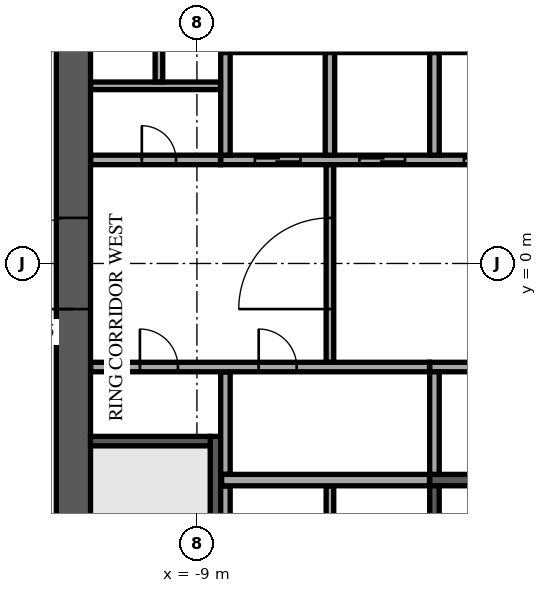
"""IFC4 building model, lengths in metres.
Left out: names, types, materials, properties, quantities, classifications, styles, units other than length and angle.
Written with IfcOpenShell. Run it as: python <this file> out.ifc"""

import sys

from ifc_helpers import new_model, si_unit, direction, frame, frame_2d, origin, place, context, subcontext, project, spatial, rectangle, extrude, element, fill, save


model = new_model("IFC4")
c1 = context("Model", 3, precision=1e-05, world=origin(), true_north=direction((0.0, 1.0)))
c2 = subcontext(c1, "Body", "Model", "MODEL_VIEW")
j1 = project(units=[si_unit("LENGTHUNIT", "METRE"), si_unit("PLANEANGLEUNIT", "RADIAN")], contexts=[c1])
p1 = place(None, origin())
s1 = spatial("IfcSite", under=j1, at=p1, CompositionType="ELEMENT")
p2 = place(p1, origin())
s2 = spatial("IfcBuilding", under=s1, at=p2, CompositionType="ELEMENT")
p3 = place(p2, frame((0.0, 0.0, 225.3)))
s3 = spatial("IfcBuildingStorey", under=s2, at=p3, CompositionType="ELEMENT", Elevation=225.3)
p4 = place(p3, frame((-12.25, -11.8, 0.0), z_axis=(0.0, 0.0, 1.0), x_axis=(0.0, 1.0, 0.0)))
e1 = element("IfcWall", 1, at=p4, inside=s3, PredefinedType="SHEAR", context=c2, shape_type="SweptSolid", body=[
    extrude(rectangle(XDim=23.6, YDim=0.9, at=frame_2d((11.8, 0.0))), origin(), (0.0, 0.0, 1.0), 3.62),
])
p5 = place(p4, frame((10.6, 0.0, 0.0)))
e2 = element("IfcOpeningElement", 2, at=p5, cuts=e1, PredefinedType="OPENING", context=c2, shape_type="SweptSolid", body=[
    extrude(rectangle(XDim=2.4, YDim=2.4, at=frame_2d((1.2, 1.2))), frame((0.0, 0.46, 0.0), z_axis=(0.0, -1.0, 0.0), x_axis=(1.0, 0.0, 0.0)), (0.0, 0.0, 1.0), 0.92),
])
p6 = place(p3, frame((-8.375, 5.7, 0.0), z_axis=(0.0, 0.0, 1.0), x_axis=(1.0, 0.0, 0.0)))
e3 = element("IfcWall", 3, at=p6, inside=s3, PredefinedType="SOLIDWALL", context=c2, shape_type="SweptSolid", body=[
    extrude(rectangle(XDim=16.75, YDim=0.3, at=frame_2d((8.375, 0.0))), origin(), (0.0, 0.0, 1.0), 3.62),
])
p7 = place(p3, frame((-2.875, -5.7, 0.0), z_axis=(0.0, 0.0, 1.0), x_axis=(1.0, 0.0, 0.0)))
e4 = element("IfcWall", 4, at=p7, inside=s3, PredefinedType="SOLIDWALL", context=c2, shape_type="SweptSolid", body=[
    extrude(rectangle(XDim=11.25, YDim=0.3, at=frame_2d((5.625, 0.0))), origin(), (0.0, 0.0, 1.0), 3.62),
])
p8 = place(p3, frame((-8.375, 2.725, 0.0), z_axis=(0.0, 0.0, 1.0), x_axis=(1.0, 0.0, 0.0)))
e5 = element("IfcWall", 5, at=p8, inside=s3, PredefinedType="SOLIDWALL", context=c2, shape_type="SweptSolid", body=[
    extrude(rectangle(XDim=16.75, YDim=0.25, at=frame_2d((8.375, 0.0))), origin(), (0.0, 0.0, 1.0), 3.62),
])
p9 = place(p8, frame((0.9, 0.0, 0.0)))
e6 = element("IfcOpeningElement", 6, at=p9, cuts=e5, PredefinedType="OPENING", context=c2, shape_type="SweptSolid", body=[
    extrude(rectangle(XDim=1.2, YDim=2.1, at=frame_2d((0.6, 1.05))), frame((0.0, 0.135, 0.0), z_axis=(0.0, -1.0, 0.0), x_axis=(1.0, 0.0, 0.0)), (0.0, 0.0, 1.0), 0.27),
])
p10 = place(p8, frame((3.65, 0.0, 0.0)))
e7 = element("IfcOpeningElement", 7, at=p10, cuts=e5, PredefinedType="OPENING", context=c2, shape_type="SweptSolid", body=[
    extrude(rectangle(XDim=1.2, YDim=2.1, at=frame_2d((0.6, 1.05))), frame((0.0, 0.135, 0.0), z_axis=(0.0, -1.0, 0.0), x_axis=(1.0, 0.0, 0.0)), (0.0, 0.0, 1.0), 0.27),
])
p11 = place(p8, frame((6.4, 0.0, 0.0)))
e8 = element("IfcOpeningElement", 8, at=p11, cuts=e5, PredefinedType="OPENING", context=c2, shape_type="SweptSolid", body=[
    extrude(rectangle(XDim=1.2, YDim=2.1, at=frame_2d((0.6, 1.05))), frame((0.0, 0.135, 0.0), z_axis=(0.0, -1.0, 0.0), x_axis=(1.0, 0.0, 0.0)), (0.0, 0.0, 1.0), 0.27),
])
p12 = place(p8, frame((9.15, 0.0, 0.0)))
e9 = element("IfcOpeningElement", 9, at=p12, cuts=e5, PredefinedType="OPENING", context=c2, shape_type="SweptSolid", body=[
    extrude(rectangle(XDim=1.2, YDim=2.1, at=frame_2d((0.6, 1.05))), frame((0.0, 0.135, 0.0), z_axis=(0.0, -1.0, 0.0), x_axis=(1.0, 0.0, 0.0)), (0.0, 0.0, 1.0), 0.27),
])
p13 = place(p8, frame((11.9, 0.0, 0.0)))
e10 = element("IfcOpeningElement", 10, at=p13, cuts=e5, PredefinedType="OPENING", context=c2, shape_type="SweptSolid", body=[
    extrude(rectangle(XDim=1.2, YDim=2.1, at=frame_2d((0.6, 1.05))), frame((0.0, 0.135, 0.0), z_axis=(0.0, -1.0, 0.0), x_axis=(1.0, 0.0, 0.0)), (0.0, 0.0, 1.0), 0.27),
])
p14 = place(p8, frame((14.65, 0.0, 0.0)))
e11 = element("IfcOpeningElement", 11, at=p14, cuts=e5, PredefinedType="OPENING", context=c2, shape_type="SweptSolid", body=[
    extrude(rectangle(XDim=1.2, YDim=2.1, at=frame_2d((0.6, 1.05))), frame((0.0, 0.135, 0.0), z_axis=(0.0, -1.0, 0.0), x_axis=(1.0, 0.0, 0.0)), (0.0, 0.0, 1.0), 0.27),
])
for number, where, z_axis, x_axis in (
    (12, (-8.25, 2.85, 0.0), (0.0, 0.0, 1.0), (0.0, 1.0, 0.0)),
    (13, (-5.5, 2.85, 0.0), (0.0, 0.0, 1.0), (0.0, 1.0, 0.0)),
    (14, (-2.75, 2.85, 0.0), (0.0, 0.0, 1.0), (0.0, 1.0, 0.0)),
):
    element("IfcWall", number, at=place(p3, frame(where, z_axis=z_axis, x_axis=x_axis)), inside=s3, PredefinedType="SOLIDWALL", context=c2, shape_type="SweptSolid", body=[
        extrude(rectangle(XDim=2.7, YDim=0.25, at=frame_2d((1.35, 0.0))), origin(), (0.0, 0.0, 1.0), 3.62),
    ])
p15 = place(p3, frame((-2.875, -2.725, 0.0), z_axis=(0.0, 0.0, 1.0), x_axis=(1.0, 0.0, 0.0)))
e15 = element("IfcWall", 15, at=p15, inside=s3, PredefinedType="SOLIDWALL", context=c2, shape_type="SweptSolid", body=[
    extrude(rectangle(XDim=8.5, YDim=0.25, at=frame_2d((4.25, 0.0))), origin(), (0.0, 0.0, 1.0), 3.62),
])
for number, where, z_axis, x_axis in (
    (16, (-2.75, -5.55, 0.0), (0.0, 0.0, 1.0), (0.0, 1.0, 0.0)),
    (17, (-2.75, -8.55, 0.0), (0.0, 0.0, 1.0), (0.0, 1.0, 0.0)),
):
    element("IfcWall", number, at=place(p3, frame(where, z_axis=z_axis, x_axis=x_axis)), inside=s3, PredefinedType="SOLIDWALL", context=c2, shape_type="SweptSolid", body=[
        extrude(rectangle(XDim=2.7, YDim=0.25, at=frame_2d((1.35, 0.0))), origin(), (0.0, 0.0, 1.0), 3.62),
    ])
p16 = place(p3, frame((-8.512, -4.55, 0.0), z_axis=(0.0, 0.0, 1.0), x_axis=(0.0, -1.0, 0.0)))
e18 = element("IfcWall", 18, at=p16, inside=s3, PredefinedType="SOLIDWALL", context=c2, shape_type="SweptSolid", body=[
    extrude(rectangle(XDim=7.25, YDim=0.275, at=frame_2d((3.625, 0.0))), origin(), (0.0, 0.0, 1.0), 3.62),
])
p17 = place(p16, frame((6.0, 0.0, 0.0)))
e19 = element("IfcOpeningElement", 19, at=p17, cuts=e18, PredefinedType="OPENING", context=c2, shape_type="SweptSolid", body=[
    extrude(rectangle(XDim=1.0, YDim=2.1, at=frame_2d((0.5, 1.05))), frame((0.0, 0.147, 0.0), z_axis=(0.0, -1.0, 0.0), x_axis=(1.0, 0.0, 0.0)), (0.0, 0.0, 1.0), 0.295),
])
p18 = place(p3, frame((-8.65, -4.675, 0.0), z_axis=(0.0, 0.0, 1.0), x_axis=(-1.0, 0.0, 0.0)))
e20 = element("IfcWall", 20, at=p18, inside=s3, PredefinedType="SOLIDWALL", context=c2, shape_type="SweptSolid", body=[
    extrude(rectangle(XDim=3.15, YDim=0.25, at=frame_2d((1.575, 0.0))), origin(), (0.0, 0.0, 1.0), 3.62),
])
p19 = place(p3, frame((-8.25, -8.545, 0.0), z_axis=(0.0, 0.0, 1.0), x_axis=(0.0, 1.0, 0.0)))
e21 = element("IfcWall", 21, at=p19, inside=s3, PredefinedType="PARTITIONING", context=c2, shape_type="SweptSolid", body=[
    extrude(rectangle(XDim=2.69, YDim=0.25, at=frame_2d((1.345, 0.0))), origin(), (0.0, 0.0, 1.0), 3.62),
])
p20 = place(p3, frame((-5.5, -8.545, 0.0), z_axis=(0.0, 0.0, 1.0), x_axis=(0.0, 1.0, 0.0)))
e22 = element("IfcWall", 22, at=p20, inside=s3, PredefinedType="PARTITIONING", context=c2, shape_type="SweptSolid", body=[
    extrude(rectangle(XDim=2.69, YDim=0.2, at=frame_2d((1.345, 0.0))), origin(), (0.0, 0.0, 1.0), 3.62),
])
p21 = place(p3, frame((-8.35, -5.7, 0.0), z_axis=(0.0, 0.0, 1.0), x_axis=(1.0, 0.0, 0.0)))
e23 = element("IfcWall", 23, at=p21, inside=s3, PredefinedType="PARTITIONING", context=c2, shape_type="SweptSolid", body=[
    extrude(rectangle(XDim=5.47, YDim=0.3, at=frame_2d((2.735, 0.0))), origin(), (0.0, 0.0, 1.0), 3.62),
])
p22 = place(p3, frame((-8.25, -5.545, 0.0), z_axis=(0.0, 0.0, 1.0), x_axis=(0.0, 1.0, 0.0)))
e24 = element("IfcWall", 24, at=p22, inside=s3, PredefinedType="PARTITIONING", context=c2, shape_type="SweptSolid", body=[
    extrude(rectangle(XDim=2.69, YDim=0.25, at=frame_2d((1.345, 0.0))), origin(), (0.0, 0.0, 1.0), 3.62),
])
p23 = place(p3, frame((-11.795, -2.725, 0.0), z_axis=(0.0, 0.0, 1.0), x_axis=(1.0, 0.0, 0.0)))
e25 = element("IfcWall", 25, at=p23, inside=s3, PredefinedType="PARTITIONING", context=c2, shape_type="SweptSolid", body=[
    extrude(rectangle(XDim=8.915, YDim=0.25, at=frame_2d((4.458, 0.0))), origin(), (0.0, 0.0, 1.0), 3.62),
])
p24 = place(p23, frame((1.295, 0.0, 0.0)))
e26 = element("IfcOpeningElement", 26, at=p24, cuts=e25, PredefinedType="OPENING", context=c2, shape_type="SweptSolid", body=[
    extrude(rectangle(XDim=1.0, YDim=2.1, at=frame_2d((0.5, 1.05))), frame((0.0, 0.135, 0.0), z_axis=(0.0, -1.0, 0.0), x_axis=(1.0, 0.0, 0.0)), (0.0, 0.0, 1.0), 0.27),
])
p25 = place(p23, frame((4.42, 0.0, 0.0)))
e27 = element("IfcOpeningElement", 27, at=p25, cuts=e25, PredefinedType="OPENING", context=c2, shape_type="SweptSolid", body=[
    extrude(rectangle(XDim=1.0, YDim=2.1, at=frame_2d((0.5, 1.05))), frame((0.0, 0.135, 0.0), z_axis=(0.0, -1.0, 0.0), x_axis=(1.0, 0.0, 0.0)), (0.0, 0.0, 1.0), 0.27),
])
p26 = place(p3, frame((-5.5, -2.595, 0.0), z_axis=(0.0, 0.0, 1.0), x_axis=(0.0, 1.0, 0.0)))
e28 = element("IfcWall", 28, at=p26, inside=s3, PredefinedType="PARTITIONING", context=c2, shape_type="SweptSolid", body=[
    extrude(rectangle(XDim=5.19, YDim=0.2, at=frame_2d((2.595, 0.0))), origin(), (0.0, 0.0, 1.0), 3.62),
])
p27 = place(p26, frame((1.395, 0.0, 0.0)))
e29 = element("IfcOpeningElement", 29, at=p27, cuts=e28, PredefinedType="OPENING", context=c2, shape_type="SweptSolid", body=[
    extrude(rectangle(XDim=2.4, YDim=2.4, at=frame_2d((1.2, 1.2))), frame((0.0, 0.11, 0.0), z_axis=(0.0, -1.0, 0.0), x_axis=(1.0, 0.0, 0.0)), (0.0, 0.0, 1.0), 0.22),
])
p28 = place(p3, frame((-11.795, 2.725, 0.0), z_axis=(0.0, 0.0, 1.0), x_axis=(1.0, 0.0, 0.0)))
e30 = element("IfcWall", 30, at=p28, inside=s3, PredefinedType="PARTITIONING", context=c2, shape_type="SweptSolid", body=[
    extrude(rectangle(XDim=3.415, YDim=0.25, at=frame_2d((1.708, 0.0))), origin(), (0.0, 0.0, 1.0), 3.62),
])
p29 = place(p28, frame((1.345, 0.0, 0.0)))
e31 = element("IfcOpeningElement", 31, at=p29, cuts=e30, PredefinedType="OPENING", context=c2, shape_type="SweptSolid", body=[
    extrude(rectangle(XDim=0.9, YDim=2.1, at=frame_2d((0.45, 1.05))), frame((0.0, 0.135, 0.0), z_axis=(0.0, -1.0, 0.0), x_axis=(1.0, 0.0, 0.0)), (0.0, 0.0, 1.0), 0.27),
])
p30 = place(p3, frame((-11.795, 4.675, 0.0), z_axis=(0.0, 0.0, 1.0), x_axis=(1.0, 0.0, 0.0)))
e32 = element("IfcWall", 32, at=p30, inside=s3, PredefinedType="PARTITIONING", context=c2, shape_type="SweptSolid", body=[
    extrude(rectangle(XDim=3.415, YDim=0.2, at=frame_2d((1.708, 0.0))), origin(), (0.0, 0.0, 1.0), 3.62),
])
p31 = place(p3, frame((-10.0, 4.78, 0.0), z_axis=(0.0, 0.0, 1.0), x_axis=(0.0, 1.0, 0.0)))
e33 = element("IfcWall", 33, at=p31, inside=s3, PredefinedType="PARTITIONING", context=c2, shape_type="SweptSolid", body=[
    extrude(rectangle(XDim=7.015, YDim=0.2, at=frame_2d((3.507, 0.0))), origin(), (0.0, 0.0, 1.0), 3.62),
])
p32 = place(p31, frame((2.92, 0.0, 0.0)))
e34 = element("IfcOpeningElement", 34, at=p32, cuts=e33, PredefinedType="OPENING", context=c2, shape_type="SweptSolid", body=[
    extrude(rectangle(XDim=1.0, YDim=2.1, at=frame_2d((0.5, 1.05))), frame((0.0, 0.11, 0.0), z_axis=(0.0, -1.0, 0.0), x_axis=(1.0, 0.0, 0.0)), (0.0, 0.0, 1.0), 0.22),
])
p33 = place(p3, frame((-3.777, 34.584, 0.0), z_axis=(0.0, 0.0, 1.0), x_axis=(-0.629323778295, -0.777143218508, 0.0)))
e35 = element("IfcWall", 35, at=p33, inside=s3, PredefinedType="STANDARD", context=c2, shape_type="SweptSolid", body=[
    extrude(rectangle(XDim=49.0, YDim=0.6, at=frame_2d((24.5, 0.0))), origin(), (0.0, 0.0, 1.0), 3.62),
])
p34 = place(p33, frame((1.227, 0.0, 0.9)))
e36 = element("IfcOpeningElement", 36, at=p34, cuts=e35, PredefinedType="OPENING", context=c2, shape_type="SweptSolid", body=[
    extrude(rectangle(XDim=2.0, YDim=2.1, at=frame_2d((1.0, 1.05))), frame((0.0, 0.31, 0.0), z_axis=(0.0, -1.0, 0.0), x_axis=(1.0, 0.0, 0.0)), (0.0, 0.0, 1.0), 0.62),
])
p35 = place(p33, frame((5.682, 0.0, 0.9)))
e37 = element("IfcOpeningElement", 37, at=p35, cuts=e35, PredefinedType="OPENING", context=c2, shape_type="SweptSolid", body=[
    extrude(rectangle(XDim=2.0, YDim=2.1, at=frame_2d((1.0, 1.05))), frame((0.0, 0.31, 0.0), z_axis=(0.0, -1.0, 0.0), x_axis=(1.0, 0.0, 0.0)), (0.0, 0.0, 1.0), 0.62),
])
p36 = place(p33, frame((10.136, 0.0, 0.9)))
e38 = element("IfcOpeningElement", 38, at=p36, cuts=e35, PredefinedType="OPENING", context=c2, shape_type="SweptSolid", body=[
    extrude(rectangle(XDim=2.0, YDim=2.1, at=frame_2d((1.0, 1.05))), frame((0.0, 0.31, 0.0), z_axis=(0.0, -1.0, 0.0), x_axis=(1.0, 0.0, 0.0)), (0.0, 0.0, 1.0), 0.62),
])
p37 = place(p33, frame((14.591, 0.0, 0.9)))
e39 = element("IfcOpeningElement", 39, at=p37, cuts=e35, PredefinedType="OPENING", context=c2, shape_type="SweptSolid", body=[
    extrude(rectangle(XDim=2.0, YDim=2.1, at=frame_2d((1.0, 1.05))), frame((0.0, 0.31, 0.0), z_axis=(0.0, -1.0, 0.0), x_axis=(1.0, 0.0, 0.0)), (0.0, 0.0, 1.0), 0.62),
])
p38 = place(p33, frame((19.045, 0.0, 0.9)))
e40 = element("IfcOpeningElement", 40, at=p38, cuts=e35, PredefinedType="OPENING", context=c2, shape_type="SweptSolid", body=[
    extrude(rectangle(XDim=2.0, YDim=2.1, at=frame_2d((1.0, 1.05))), frame((0.0, 0.31, 0.0), z_axis=(0.0, -1.0, 0.0), x_axis=(1.0, 0.0, 0.0)), (0.0, 0.0, 1.0), 0.62),
])
p39 = place(p33, frame((23.5, 0.0, 0.9)))
e41 = element("IfcOpeningElement", 41, at=p39, cuts=e35, PredefinedType="OPENING", context=c2, shape_type="SweptSolid", body=[
    extrude(rectangle(XDim=2.0, YDim=2.1, at=frame_2d((1.0, 1.05))), frame((0.0, 0.31, 0.0), z_axis=(0.0, -1.0, 0.0), x_axis=(1.0, 0.0, 0.0)), (0.0, 0.0, 1.0), 0.62),
])
p40 = place(p33, frame((27.955, 0.0, 0.9)))
e42 = element("IfcOpeningElement", 42, at=p40, cuts=e35, PredefinedType="OPENING", context=c2, shape_type="SweptSolid", body=[
    extrude(rectangle(XDim=2.0, YDim=2.1, at=frame_2d((1.0, 1.05))), frame((0.0, 0.31, 0.0), z_axis=(0.0, -1.0, 0.0), x_axis=(1.0, 0.0, 0.0)), (0.0, 0.0, 1.0), 0.62),
])
p41 = place(p33, frame((32.409, 0.0, 0.9)))
e43 = element("IfcOpeningElement", 43, at=p41, cuts=e35, PredefinedType="OPENING", context=c2, shape_type="SweptSolid", body=[
    extrude(rectangle(XDim=2.0, YDim=2.1, at=frame_2d((1.0, 1.05))), frame((0.0, 0.31, 0.0), z_axis=(0.0, -1.0, 0.0), x_axis=(1.0, 0.0, 0.0)), (0.0, 0.0, 1.0), 0.62),
])
p42 = place(p33, frame((36.864, 0.0, 0.9)))
e44 = element("IfcOpeningElement", 44, at=p42, cuts=e35, PredefinedType="OPENING", context=c2, shape_type="SweptSolid", body=[
    extrude(rectangle(XDim=2.0, YDim=2.1, at=frame_2d((1.0, 1.05))), frame((0.0, 0.31, 0.0), z_axis=(0.0, -1.0, 0.0), x_axis=(1.0, 0.0, 0.0)), (0.0, 0.0, 1.0), 0.62),
])
p43 = place(p33, frame((41.318, 0.0, 0.9)))
e45 = element("IfcOpeningElement", 45, at=p43, cuts=e35, PredefinedType="OPENING", context=c2, shape_type="SweptSolid", body=[
    extrude(rectangle(XDim=2.0, YDim=2.1, at=frame_2d((1.0, 1.05))), frame((0.0, 0.31, 0.0), z_axis=(0.0, -1.0, 0.0), x_axis=(1.0, 0.0, 0.0)), (0.0, 0.0, 1.0), 0.62),
])
p44 = place(p33, frame((45.773, 0.0, 0.9)))
e46 = element("IfcOpeningElement", 46, at=p44, cuts=e35, PredefinedType="OPENING", context=c2, shape_type="SweptSolid", body=[
    extrude(rectangle(XDim=2.0, YDim=2.1, at=frame_2d((1.0, 1.05))), frame((0.0, 0.31, 0.0), z_axis=(0.0, -1.0, 0.0), x_axis=(1.0, 0.0, 0.0)), (0.0, 0.0, 1.0), 0.62),
])
p45 = place(p3, frame((-26.769, -2.487, 0.0), z_axis=(0.0, 0.0, 1.0), x_axis=(0.629320703929, 0.777145708092, 0.0)))
e47 = element("IfcWall", 47, at=p45, inside=s3, PredefinedType="PARTITIONING", context=c2, shape_type="SweptSolid", body=[
    extrude(rectangle(XDim=37.558, YDim=0.15, at=frame_2d((18.779, 0.0))), origin(), (0.0, 0.0, 1.0), 2.97),
])
p46 = place(p45, frame((3.55, 0.0, 0.0)))
e48 = element("IfcOpeningElement", 48, at=p46, cuts=e47, PredefinedType="OPENING", context=c2, shape_type="SweptSolid", body=[
    extrude(rectangle(XDim=1.0, YDim=2.1, at=frame_2d((0.5, 1.05))), frame((0.0, 0.085, 0.0), z_axis=(0.0, -1.0, 0.0), x_axis=(1.0, 0.0, 0.0)), (0.0, 0.0, 1.0), 0.17),
])
p47 = place(p45, frame((11.862, 0.0, 0.0)))
e49 = element("IfcOpeningElement", 49, at=p47, cuts=e47, PredefinedType="OPENING", context=c2, shape_type="SweptSolid", body=[
    extrude(rectangle(XDim=1.0, YDim=2.1, at=frame_2d((0.5, 1.05))), frame((0.0, 0.085, 0.0), z_axis=(0.0, -1.0, 0.0), x_axis=(1.0, 0.0, 0.0)), (0.0, 0.0, 1.0), 0.17),
])
p48 = place(p45, frame((21.452, 0.0, 0.0)))
e50 = element("IfcOpeningElement", 50, at=p48, cuts=e47, PredefinedType="OPENING", context=c2, shape_type="SweptSolid", body=[
    extrude(rectangle(XDim=1.0, YDim=2.1, at=frame_2d((0.5, 1.05))), frame((0.0, 0.085, 0.0), z_axis=(0.0, -1.0, 0.0), x_axis=(1.0, 0.0, 0.0)), (0.0, 0.0, 1.0), 0.17),
])
p49 = place(p45, frame((31.223, 0.0, 0.0)))
e51 = element("IfcOpeningElement", 51, at=p49, cuts=e47, PredefinedType="OPENING", context=c2, shape_type="SweptSolid", body=[
    extrude(rectangle(XDim=1.0, YDim=2.1, at=frame_2d((0.5, 1.05))), frame((0.0, 0.085, 0.0), z_axis=(0.0, -1.0, 0.0), x_axis=(1.0, 0.0, 0.0)), (0.0, 0.0, 1.0), 0.17),
])
p50 = place(p45, frame((35.359, 0.0, 0.0)))
e52 = element("IfcOpeningElement", 52, at=p50, cuts=e47, PredefinedType="OPENING", context=c2, shape_type="SweptSolid", body=[
    extrude(rectangle(XDim=1.0, YDim=2.1, at=frame_2d((0.5, 1.05))), frame((0.0, 0.085, 0.0), z_axis=(0.0, -1.0, 0.0), x_axis=(1.0, 0.0, 0.0)), (0.0, 0.0, 1.0), 0.17),
])
p51 = place(p5, origin())
e53 = element("IfcDoor", 53, at=p51, inside=s3, OperationType="SINGLE_SWING_LEFT", PredefinedType="DOOR", context=c2, shape_type="SweptSolid", body=[
    extrude(rectangle(XDim=2.4, YDim=2.4, at=frame_2d((1.2, 1.2))), frame((0.0, 0.025, 0.0), z_axis=(0.0, -1.0, 0.0), x_axis=(1.0, 0.0, 0.0)), (0.0, 0.0, 1.0), 0.05),
])
fill(e2, e53)
p52 = place(p9, origin())
e54 = element("IfcDoor", 54, at=p52, inside=s3, OperationType="DOUBLE_DOOR_SLIDING", PredefinedType="DOOR", context=c2, shape_type="SweptSolid", body=[
    extrude(rectangle(XDim=1.2, YDim=2.1, at=frame_2d((0.6, 1.05))), frame((0.0, 0.025, 0.0), z_axis=(0.0, -1.0, 0.0), x_axis=(1.0, 0.0, 0.0)), (0.0, 0.0, 1.0), 0.05),
])
fill(e6, e54)
p53 = place(p10, origin())
e55 = element("IfcDoor", 55, at=p53, inside=s3, OperationType="DOUBLE_DOOR_SLIDING", PredefinedType="DOOR", context=c2, shape_type="SweptSolid", body=[
    extrude(rectangle(XDim=1.2, YDim=2.1, at=frame_2d((0.6, 1.05))), frame((0.0, 0.025, 0.0), z_axis=(0.0, -1.0, 0.0), x_axis=(1.0, 0.0, 0.0)), (0.0, 0.0, 1.0), 0.05),
])
fill(e7, e55)
p54 = place(p11, origin())
e56 = element("IfcDoor", 56, at=p54, inside=s3, OperationType="DOUBLE_DOOR_SLIDING", PredefinedType="DOOR", context=c2, shape_type="SweptSolid", body=[
    extrude(rectangle(XDim=1.2, YDim=2.1, at=frame_2d((0.6, 1.05))), frame((0.0, 0.025, 0.0), z_axis=(0.0, -1.0, 0.0), x_axis=(1.0, 0.0, 0.0)), (0.0, 0.0, 1.0), 0.05),
])
fill(e8, e56)
p55 = place(p24, origin())
e57 = element("IfcDoor", 57, at=p55, inside=s3, OperationType="SINGLE_SWING_RIGHT", PredefinedType="DOOR", context=c2, shape_type="SweptSolid", body=[
    extrude(rectangle(XDim=1.0, YDim=2.1, at=frame_2d((0.5, 1.05))), frame((0.0, 0.025, 0.0), z_axis=(0.0, -1.0, 0.0), x_axis=(1.0, 0.0, 0.0)), (0.0, 0.0, 1.0), 0.05),
])
fill(e26, e57)
p56 = place(p29, origin())
e58 = element("IfcDoor", 58, at=p56, inside=s3, OperationType="SINGLE_SWING_RIGHT", PredefinedType="DOOR", context=c2, shape_type="SweptSolid", body=[
    extrude(rectangle(XDim=0.9, YDim=2.1, at=frame_2d((0.45, 1.05))), frame((0.0, 0.025, 0.0), z_axis=(0.0, -1.0, 0.0), x_axis=(1.0, 0.0, 0.0)), (0.0, 0.0, 1.0), 0.05),
])
fill(e31, e58)
p57 = place(p25, origin())
e59 = element("IfcDoor", 59, at=p57, inside=s3, OperationType="SINGLE_SWING_RIGHT", PredefinedType="DOOR", context=c2, shape_type="SweptSolid", body=[
    extrude(rectangle(XDim=1.0, YDim=2.1, at=frame_2d((0.5, 1.05))), frame((0.0, 0.025, 0.0), z_axis=(0.0, -1.0, 0.0), x_axis=(1.0, 0.0, 0.0)), (0.0, 0.0, 1.0), 0.05),
])
fill(e27, e59)
p58 = place(p27, origin())
e60 = element("IfcDoor", 60, at=p58, inside=s3, OperationType="DOUBLE_DOOR_DOUBLE_SWING", PredefinedType="DOOR", context=c2, shape_type="SweptSolid", body=[
    extrude(rectangle(XDim=2.4, YDim=2.4, at=frame_2d((1.2, 1.2))), frame((0.0, 0.025, 0.0), z_axis=(0.0, -1.0, 0.0), x_axis=(1.0, 0.0, 0.0)), (0.0, 0.0, 1.0), 0.05),
])
fill(e29, e60)
save(model, sys.argv[1])
